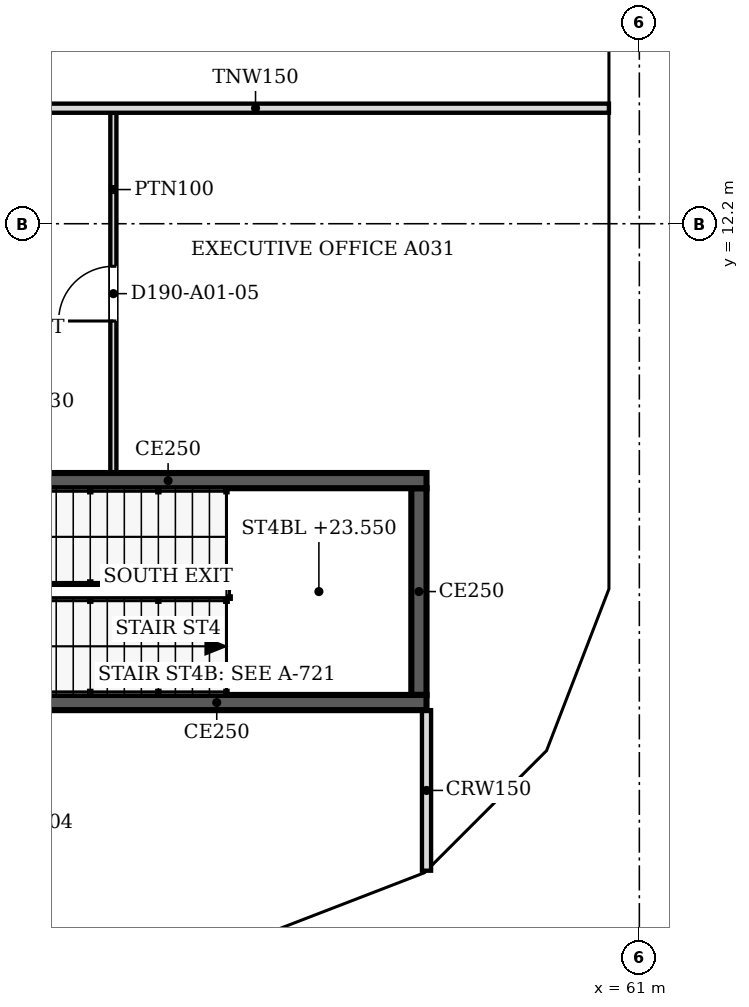
"""IFC4 building model, lengths in metres.
Left out: names, types, materials, properties, quantities, classifications, styles, units other than length and angle.
Written with IfcOpenShell. Run it as: python <this file> out.ifc"""

import sys

from ifc_helpers import new_model, si_unit, direction, frame, frame_2d, origin, place, context, subcontext, project, spatial, polyline, rectangle, outline, extrude, faceted_brep, source, transform, mapped, element, fill, save


model = new_model("IFC4")
c1 = context("Model", 3, precision=1e-05, world=origin(), true_north=direction((0.0, 1.0)))
c2 = subcontext(c1, "Body", "Model", "MODEL_VIEW")
j1 = project(units=[si_unit("LENGTHUNIT", "METRE"), si_unit("PLANEANGLEUNIT", "RADIAN")], contexts=[c1])
p1 = place(None, origin())
s1 = spatial("IfcSite", under=j1, at=p1, CompositionType="ELEMENT")
p2 = place(p1, origin())
s2 = spatial("IfcBuilding", under=s1, at=p2, CompositionType="ELEMENT")
p3 = place(p2, frame((0.0, 0.0, 21.3)))
s3 = spatial("IfcBuildingStorey", under=s2, at=p3, CompositionType="ELEMENT", Elevation=21.3)
m1 = source(origin(), c2, "Body", "Brep", [
    faceted_brep([(2.95, -0.25, 0.0), (3.003, -0.25, 0.081), (3.003, -0.25, 8.919), (2.95, -0.25, 9.0), (0.0, -0.25, 4.5), (0.047, 0.25, 4.571), (2.898, 0.25, 8.919), (2.898, 0.25, 0.081), (0.047, 0.25, 4.429), (2.95, 0.0, 0.0), (2.95, 0.0, 9.0), (0.0, 0.0, 4.5)], [[[0, 1, 2, 3, 4]], [[5, 6, 7, 8]], [[1, 0, 9]], [[10, 3, 2]], [[6, 5, 11, 4, 3, 10]], [[8, 7, 9, 0, 4, 11]], [[8, 11, 5]], [[1, 9, 7, 6, 10, 2]]]),
])
p4 = place(p3, frame((54.854, 0.25, -4.5), z_axis=(0.0, 0.0, 1.0), x_axis=(0.932970071518, 0.359953949349, 0.0)))
e1 = element("IfcWall", 1, at=p4, inside=s3, PredefinedType="SOLIDWALL", context=c2, shape_type="MappedRepresentation", body=[
    mapped(m1, transform((0.0, 0.0, 0.0), scale=1.0)),
])
m2 = source(origin(), c2, "Body", "SweptSolid", [
    extrude(outline(polyline([(2.75, 8.239), (0.299, 4.5), (2.75, 0.761), (2.75, 8.239)])), frame((0.0, 0.26, 0.0), z_axis=(0.0, -1.0, 0.0), x_axis=(1.0, 0.0, 0.0)), (0.0, 0.0, 1.0), 0.52),
])
p5 = place(p4, origin())
e2 = element("IfcOpeningElement", 2, at=p5, cuts=e1, PredefinedType="OPENING", context=c2, shape_type="MappedRepresentation", body=[
    mapped(m2, transform((0.0, 0.0, 0.0), scale=1.0)),
])
m3 = source(origin(), c2, "Body", "Brep", [
    faceted_brep([(0.053, -0.25, 0.0), (2.997, -0.25, 4.5), (0.053, -0.25, 9.0), (0.0, -0.25, 8.919), (0.0, -0.25, 0.081), (0.106, 0.25, 8.919), (2.944, 0.25, 4.581), (2.944, 0.25, 4.419), (0.106, 0.25, 0.081), (2.997, 0.0, 4.5), (0.053, 0.0, 0.0), (0.053, 0.0, 9.0)], [[[0, 1, 2, 3, 4]], [[5, 6, 7, 8]], [[8, 7, 9, 1, 0, 10]], [[6, 5, 11, 2, 1, 9]], [[3, 2, 11]], [[10, 0, 4]], [[8, 10, 4, 3, 11, 5]], [[9, 7, 6]]]),
])
p6 = place(p3, frame((57.569, 1.274, -4.5), z_axis=(0.0, 0.0, 1.0), x_axis=(0.707066050402, 0.707147509625, 0.0)))
e3 = element("IfcWall", 3, at=p6, inside=s3, PredefinedType="SOLIDWALL", context=c2, shape_type="MappedRepresentation", body=[
    mapped(m3, transform((0.0, 0.0, 0.0), scale=1.0)),
])
m4 = source(origin(), c2, "Body", "SweptSolid", [
    extrude(outline(polyline([(0.253, 0.762), (2.698, 4.5), (0.253, 8.238), (0.253, 0.762)])), frame((0.0, 0.26, 0.0), z_axis=(0.0, -1.0, 0.0), x_axis=(1.0, 0.0, 0.0)), (0.0, 0.0, 1.0), 0.52),
])
p7 = place(p6, origin())
e4 = element("IfcOpeningElement", 4, at=p7, cuts=e3, PredefinedType="OPENING", context=c2, shape_type="MappedRepresentation", body=[
    mapped(m4, transform((0.0, 0.0, 0.0), scale=1.0)),
])
m5 = source(origin(), c2, "Body", "Brep", [
    faceted_brep([(2.95, -0.25, 0.0), (2.997, -0.25, 0.07), (2.997, -0.25, 8.93), (2.95, -0.25, 9.0), (0.0, -0.25, 4.5), (0.053, 0.25, 4.581), (2.904, 0.25, 8.929), (2.904, 0.25, 0.071), (0.053, 0.25, 4.419), (2.95, 0.0, 0.0), (2.95, 0.0, 9.0), (0.0, 0.0, 4.5)], [[[0, 1, 2, 3, 4]], [[5, 6, 7, 8]], [[1, 0, 9]], [[10, 3, 2]], [[6, 5, 11, 4, 3, 10]], [[8, 7, 9, 0, 4, 11]], [[8, 11, 5]], [[1, 9, 7, 6, 10, 2]]]),
])
p8 = place(p3, frame((59.688, 3.394, -4.5), z_axis=(0.0, 0.0, 1.0), x_axis=(0.359972353723, 0.932962970624, 0.0)))
e5 = element("IfcWall", 5, at=p8, inside=s3, PredefinedType="SOLIDWALL", context=c2, shape_type="MappedRepresentation", body=[
    mapped(m5, transform((0.0, 0.0, 0.0), scale=1.0)),
])
p9 = place(p8, origin())
e6 = element("IfcOpeningElement", 6, at=p9, cuts=e5, PredefinedType="OPENING", context=c2, shape_type="MappedRepresentation", body=[
    mapped(m2, transform((0.0, 0.0, 0.0), scale=1.0)),
])
m6 = source(origin(), c2, "Body", "Brep", [
    faceted_brep([(0.047, -0.25, 0.0), (3.05, -0.25, 4.5), (0.047, -0.25, 9.0), (0.0, -0.25, 8.929), (0.0, -0.25, 0.071), (0.093, 0.25, 8.93), (3.05, 0.25, 4.5), (0.093, 0.25, 0.07), (0.047, 0.0, 0.0), (0.047, 0.0, 9.0)], [[[0, 1, 2, 3, 4]], [[5, 6, 7]], [[7, 6, 1, 0, 8]], [[6, 5, 9, 2, 1]], [[3, 2, 9]], [[8, 0, 4]], [[7, 8, 4, 3, 9, 5]]]),
])
p10 = place(p3, frame((60.75, 6.1, -4.5), z_axis=(0.0, 0.0, 1.0), x_axis=(0.0, 1.0, 0.0)))
e7 = element("IfcWall", 7, at=p10, inside=s3, PredefinedType="SOLIDWALL", context=c2, shape_type="MappedRepresentation", body=[
    mapped(m6, transform((0.0, 0.0, 0.0), scale=1.0)),
])
m7 = source(origin(), c2, "Body", "SweptSolid", [
    extrude(outline(polyline([(0.247, 0.75), (2.75, 4.5), (0.247, 8.25), (0.247, 0.75)])), frame((0.0, 0.26, 0.0), z_axis=(0.0, -1.0, 0.0), x_axis=(1.0, 0.0, 0.0)), (0.0, 0.0, 1.0), 0.52),
])
p11 = place(p10, origin())
e8 = element("IfcOpeningElement", 8, at=p11, cuts=e7, PredefinedType="OPENING", context=c2, shape_type="MappedRepresentation", body=[
    mapped(m7, transform((0.0, 0.0, 0.0), scale=1.0)),
])
m8 = source(origin(), c2, "Body", "SweptSolid", [
    extrude(outline(polyline([(3.05, 0.0), (6.1, 4.5), (3.05, 9.0), (0.0, 4.5), (3.05, 0.0)])), frame((0.0, 0.25, 0.0), z_axis=(0.0, -1.0, 0.0), x_axis=(1.0, 0.0, 0.0)), (0.0, 0.0, 1.0), 0.5),
])
p12 = place(p3, frame((60.75, 9.15, -4.5), z_axis=(0.0, 0.0, 1.0), x_axis=(0.0, 1.0, 0.0)))
e9 = element("IfcWall", 9, at=p12, inside=s3, PredefinedType="SOLIDWALL", context=c2, shape_type="MappedRepresentation", body=[
    mapped(m8, transform((0.0, 0.0, 0.0), scale=1.0)),
])
m9 = source(origin(), c2, "Body", "SweptSolid", [
    extrude(outline(polyline([(3.05, 0.446), (5.798, 4.5), (3.05, 8.554), (0.302, 4.5), (3.05, 0.446)])), frame((0.0, 0.26, 0.0), z_axis=(0.0, -1.0, 0.0), x_axis=(1.0, 0.0, 0.0)), (0.0, 0.0, 1.0), 0.52),
])
p13 = place(p12, origin())
e10 = element("IfcOpeningElement", 10, at=p13, cuts=e9, PredefinedType="OPENING", context=c2, shape_type="MappedRepresentation", body=[
    mapped(m9, transform((0.0, 0.0, 0.0), scale=1.0)),
])
m10 = source(origin(), c2, "Body", "Brep", [
    faceted_brep([(0.047, -0.25, 0.0), (2.997, -0.25, 4.5), (0.0, -0.25, 4.5), (0.0, -0.25, 0.07), (0.093, 0.25, 4.5), (2.944, 0.25, 4.5), (2.944, 0.25, 4.419), (0.093, 0.25, 0.071), (2.997, 0.0, 4.5), (0.047, 0.0, 0.0)], [[[0, 1, 2, 3]], [[4, 5, 6, 7]], [[7, 6, 8, 1, 0, 9]], [[5, 4, 2, 1, 8]], [[9, 0, 3]], [[7, 9, 3, 2, 4]], [[6, 5, 8]]]),
])
p14 = place(p3, frame((54.81, 0.233, 0.0), z_axis=(0.0, 0.0, 1.0), x_axis=(0.932990326376, 0.359901446078, 0.0)))
e11 = element("IfcWall", 11, at=p14, inside=s3, PredefinedType="SOLIDWALL", context=c2, shape_type="MappedRepresentation", body=[
    mapped(m10, transform((0.0, 0.0, 0.0), scale=1.0)),
])
m11 = source(origin(), c2, "Body", "SweptSolid", [
    extrude(outline(polyline([(0.247, 0.761), (2.534, 4.25), (0.247, 4.25), (0.247, 0.761)])), frame((0.0, 0.26, 0.0), z_axis=(0.0, -1.0, 0.0), x_axis=(1.0, 0.0, 0.0)), (0.0, 0.0, 1.0), 0.52),
])
p15 = place(p14, origin())
e12 = element("IfcOpeningElement", 12, at=p15, cuts=e11, PredefinedType="OPENING", context=c2, shape_type="MappedRepresentation", body=[
    mapped(m11, transform((0.0, 0.0, 0.0), scale=1.0)),
])
m12 = source(origin(), c2, "Body", "Brep", [
    faceted_brep([(2.944, -0.25, 0.0), (2.997, -0.25, 0.081), (2.997, -0.25, 4.5), (0.0, -0.25, 4.5), (0.053, 0.25, 4.5), (2.891, 0.25, 4.5), (2.891, 0.25, 0.081), (0.053, 0.25, 4.419), (2.944, 0.0, 0.0), (0.0, 0.0, 4.5)], [[[0, 1, 2, 3]], [[4, 5, 6, 7]], [[1, 0, 8]], [[5, 4, 9, 3, 2]], [[7, 6, 8, 0, 3, 9]], [[7, 9, 4]], [[1, 8, 6, 5, 2]]]),
])
p16 = place(p3, frame((57.606, 1.312, 0.0), z_axis=(0.0, 0.0, 1.0), x_axis=(0.707147509625, 0.707066050402, 0.0)))
e13 = element("IfcWall", 13, at=p16, inside=s3, PredefinedType="SOLIDWALL", context=c2, shape_type="MappedRepresentation", body=[
    mapped(m12, transform((0.0, 0.0, 0.0), scale=1.0)),
])
m13 = source(origin(), c2, "Body", "SweptSolid", [
    extrude(outline(polyline([(2.744, 4.25), (0.462, 4.25), (2.744, 0.762), (2.744, 4.25)])), frame((0.0, 0.26, 0.0), z_axis=(0.0, -1.0, 0.0), x_axis=(1.0, 0.0, 0.0)), (0.0, 0.0, 1.0), 0.52),
])
p17 = place(p16, origin())
e14 = element("IfcOpeningElement", 14, at=p17, cuts=e13, PredefinedType="OPENING", context=c2, shape_type="MappedRepresentation", body=[
    mapped(m13, transform((0.0, 0.0, 0.0), scale=1.0)),
])
m14 = source(origin(), c2, "Body", "Brep", [
    faceted_brep([(0.053, -0.25, 0.0), (3.003, -0.25, 4.5), (0.0, -0.25, 4.5), (0.0, -0.25, 0.081), (0.106, 0.25, 4.5), (2.957, 0.25, 4.5), (2.957, 0.25, 4.429), (0.106, 0.25, 0.081), (3.003, 0.0, 4.5), (0.053, 0.0, 0.0)], [[[0, 1, 2, 3]], [[4, 5, 6, 7]], [[7, 6, 8, 1, 0, 9]], [[5, 4, 2, 1, 8]], [[9, 0, 3]], [[7, 9, 3, 2, 4]], [[6, 5, 8]]]),
])
p18 = place(p3, frame((59.669, 3.344, 0.0), z_axis=(0.0, 0.0, 1.0), x_axis=(0.35992665181, 0.932980602862, 0.0)))
e15 = element("IfcWall", 15, at=p18, inside=s3, PredefinedType="SOLIDWALL", context=c2, shape_type="MappedRepresentation", body=[
    mapped(m14, transform((0.0, 0.0, 0.0), scale=1.0)),
])
m15 = source(origin(), c2, "Body", "SweptSolid", [
    extrude(outline(polyline([(0.253, 0.761), (2.541, 4.25), (0.253, 4.25), (0.253, 0.761)])), frame((0.0, 0.26, 0.0), z_axis=(0.0, -1.0, 0.0), x_axis=(1.0, 0.0, 0.0)), (0.0, 0.0, 1.0), 0.52),
])
p19 = place(p18, origin())
e16 = element("IfcOpeningElement", 16, at=p19, cuts=e15, PredefinedType="OPENING", context=c2, shape_type="MappedRepresentation", body=[
    mapped(m15, transform((0.0, 0.0, 0.0), scale=1.0)),
])
m16 = source(origin(), c2, "Body", "Brep", [
    faceted_brep([(3.003, -0.25, 0.0), (6.053, -0.25, 4.5), (0.0, -0.25, 4.5), (0.047, 0.25, 4.5), (6.053, 0.25, 4.5), (3.003, 0.25, 0.0), (0.047, 0.25, 4.43), (0.0, 0.0, 4.5)], [[[0, 1, 2]], [[3, 4, 5, 6]], [[5, 4, 1, 0]], [[4, 3, 7, 2, 1]], [[6, 5, 0, 2, 7]], [[6, 7, 3]]]),
])
p20 = place(p3, frame((60.75, 6.146, 0.0), z_axis=(0.0, 0.0, 1.0), x_axis=(0.0, 1.0, 0.0)))
e17 = element("IfcWall", 17, at=p20, inside=s3, PredefinedType="SOLIDWALL", context=c2, shape_type="MappedRepresentation", body=[
    mapped(m16, transform((0.0, 0.0, 0.0), scale=1.0)),
])
m17 = source(origin(), c2, "Body", "SweptSolid", [
    extrude(outline(polyline([(3.005, 0.448), (5.582, 4.25), (0.468, 4.25), (3.005, 0.448)])), frame((0.0, 0.26, 0.0), z_axis=(0.0, -1.0, 0.0), x_axis=(1.0, 0.0, 0.0)), (0.0, 0.0, 1.0), 0.52),
])
p21 = place(p20, origin())
e18 = element("IfcOpeningElement", 18, at=p21, cuts=e17, PredefinedType="OPENING", context=c2, shape_type="MappedRepresentation", body=[
    mapped(m17, transform((0.0, 0.0, 0.0), scale=1.0)),
])
m18 = source(origin(), c2, "Body", "SweptSolid", [
    extrude(outline(polyline([(3.05, 0.0), (6.1, 4.5), (0.0, 4.5), (3.05, 0.0)])), frame((0.0, 0.25, 0.0), z_axis=(0.0, -1.0, 0.0), x_axis=(1.0, 0.0, 0.0)), (0.0, 0.0, 1.0), 0.5),
])
p22 = place(p3, frame((60.75, 12.2, 0.0), z_axis=(0.0, 0.0, 1.0), x_axis=(0.0, 1.0, 0.0)))
e19 = element("IfcWall", 19, at=p22, inside=s3, PredefinedType="SOLIDWALL", context=c2, shape_type="MappedRepresentation", body=[
    mapped(m18, transform((0.0, 0.0, 0.0), scale=1.0)),
])
m19 = source(origin(), c2, "Body", "SweptSolid", [
    extrude(outline(polyline([(3.05, 0.446), (5.629, 4.25), (0.471, 4.25), (3.05, 0.446)])), frame((0.0, 0.26, 0.0), z_axis=(0.0, -1.0, 0.0), x_axis=(1.0, 0.0, 0.0)), (0.0, 0.0, 1.0), 0.52),
])
p23 = place(p22, origin())
e20 = element("IfcOpeningElement", 20, at=p23, cuts=e19, PredefinedType="OPENING", context=c2, shape_type="MappedRepresentation", body=[
    mapped(m19, transform((0.0, 0.0, 0.0), scale=1.0)),
])
p24 = place(p3, frame((57.5, 4.325, 0.0), z_axis=(0.0, 0.0, 1.0), x_axis=(-1.0, 0.0, 0.0)))
e21 = element("IfcWall", 21, at=p24, inside=s3, PredefinedType="SOLIDWALL", context=c2, shape_type="SweptSolid", body=[
    extrude(rectangle(XDim=8.5, YDim=0.25, at=frame_2d((4.25, 0.0))), origin(), (0.0, 0.0, 1.0), 4.5),
])
m20 = source(origin(), c2, "Body", "SweptSolid", [
    extrude(rectangle(XDim=1.2, YDim=2.1, at=frame_2d((0.6, 1.05))), frame((0.0, 0.135, 0.0), z_axis=(0.0, -1.0, 0.0), x_axis=(1.0, 0.0, 0.0)), (0.0, 0.0, 1.0), 0.27),
])
p25 = place(p24, frame((6.9, 0.0, 0.0)))
e22 = element("IfcOpeningElement", 22, at=p25, cuts=e21, PredefinedType="OPENING", context=c2, shape_type="MappedRepresentation", body=[
    mapped(m20, transform((0.0, 0.0, 0.0), scale=1.0)),
])
p26 = place(p3, frame((49.0, 7.975, 0.0), z_axis=(0.0, 0.0, 1.0), x_axis=(1.0, 0.0, 0.0)))
e23 = element("IfcWall", 23, at=p26, inside=s3, PredefinedType="SOLIDWALL", context=c2, shape_type="SweptSolid", body=[
    extrude(rectangle(XDim=8.5, YDim=0.25, at=frame_2d((4.25, 0.0))), origin(), (0.0, 0.0, 1.0), 4.5),
])
p27 = place(p3, frame((57.375, 7.85, 0.0), z_axis=(0.0, 0.0, 1.0), x_axis=(0.0, -1.0, 0.0)))
e24 = element("IfcWall", 24, at=p27, inside=s3, PredefinedType="SOLIDWALL", context=c2, shape_type="SweptSolid", body=[
    extrude(rectangle(XDim=3.4, YDim=0.25, at=frame_2d((1.7, 0.0))), origin(), (0.0, 0.0, 1.0), 4.5),
])
p28 = place(p3, frame((57.5, 1.559, 0.0), z_axis=(0.0, 0.0, 1.0), x_axis=(0.0, 1.0, 0.0)))
e25 = element("IfcWall", 25, at=p28, inside=s3, PredefinedType="PARTITIONING", context=c2, shape_type="SweptSolid", body=[
    extrude(rectangle(XDim=2.641, YDim=0.15, at=frame_2d((1.32, 0.0))), origin(), (0.0, 0.0, 1.0), 3.767),
])
p29 = place(p3, frame((52.35, 14.024, 0.0), z_axis=(0.0, 0.0, 1.0), x_axis=(0.0, -1.0, 0.0)))
e26 = element("IfcWall", 26, at=p29, inside=s3, PredefinedType="PARTITIONING", context=c2, shape_type="SweptSolid", body=[
    extrude(rectangle(XDim=5.924, YDim=0.1, at=frame_2d((2.962, 0.0))), origin(), (0.0, 0.0, 1.0), 3.767),
])
m21 = source(origin(), c2, "Body", "SweptSolid", [
    extrude(rectangle(XDim=0.9, YDim=2.1, at=frame_2d((0.45, 1.05))), frame((0.0, 0.06, 0.0), z_axis=(0.0, -1.0, 0.0), x_axis=(1.0, 0.0, 0.0)), (0.0, 0.0, 1.0), 0.12),
])
p30 = place(p29, frame((2.524, 0.0, 0.0)))
e27 = element("IfcOpeningElement", 27, at=p30, cuts=e26, PredefinedType="OPENING", context=c2, shape_type="MappedRepresentation", body=[
    mapped(m21, transform((0.0, 0.0, 0.0), scale=1.0)),
])
p31 = place(p3, frame((48.876, 14.1, 0.0), z_axis=(0.0, 0.0, 1.0), x_axis=(1.0, 0.0, 0.0)))
e28 = element("IfcWall", 28, at=p31, inside=s3, PredefinedType="PARTITIONING", context=c2, shape_type="SweptSolid", body=[
    extrude(rectangle(XDim=11.624, YDim=0.15, at=frame_2d((5.812, 0.0))), origin(), (0.0, 0.0, 1.0), 3.767),
])
m22 = source(origin(), c2, "Body", "SweptSolid", [
    extrude(rectangle(XDim=0.9, YDim=2.1, at=frame_2d((0.45, 1.05))), frame((0.0, 0.025, 0.0), z_axis=(0.0, -1.0, 0.0), x_axis=(1.0, 0.0, 0.0)), (0.0, 0.0, 1.0), 0.05),
])
p32 = place(p30, origin())
e29 = element("IfcDoor", 29, at=p32, inside=s3, OperationType="SINGLE_SWING_RIGHT", PredefinedType="DOOR", context=c2, shape_type="MappedRepresentation", body=[
    mapped(m22, transform((0.0, 0.0, 0.0), scale=1.0)),
])
fill(e27, e29)
save(model, sys.argv[1])
